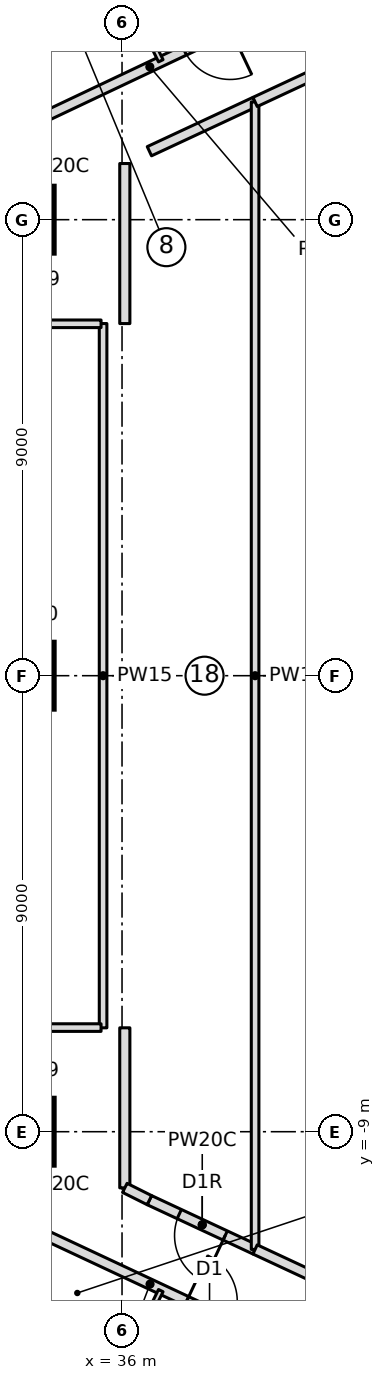
"""IFC4 building model, lengths in metres.
Left out: names, types, materials, properties, quantities, classifications, styles, units other than length and angle.
Written with IfcOpenShell. Run it as: python <this file> out.ifc"""

import sys

from ifc_helpers import new_model, si_unit, direction, frame, frame_2d, origin, origin_2d, place, context, subcontext, project, spatial, rectangle, extrude, element, fill, save


model = new_model("IFC4")
c1 = context("Model", 3, precision=1e-05, world=origin(), true_north=direction((0.0, 1.0)))
c2 = subcontext(c1, "Body", "Model", "MODEL_VIEW")
j1 = project(units=[si_unit("LENGTHUNIT", "METRE"), si_unit("PLANEANGLEUNIT", "RADIAN")], contexts=[c1])
p1 = place(None, origin())
s1 = spatial("IfcSite", under=j1, at=p1, CompositionType="ELEMENT")
p2 = place(p1, origin())
s2 = spatial("IfcBuilding", under=s1, at=p2, CompositionType="ELEMENT")
p3 = place(p2, frame((0.0, 0.0, 43.15)))
s3 = spatial("IfcBuildingStorey", under=s2, at=p3, CompositionType="ELEMENT", Elevation=43.15)
for number, where, z_axis, x_axis in (
    (1, (34.0, -9.0, 0.0), (0.0, 0.0, 1.0), (1.0, 0.0, 0.0)),
    (2, (34.0, 0.0, 0.0), (0.0, 0.0, 1.0), (1.0, 0.0, 0.0)),
    (3, (34.0, 9.0, 0.0), (0.0, 0.0, 1.0), (1.0, 0.0, 0.0)),
):
    element("IfcColumn", number, at=place(p3, frame(where, z_axis=z_axis, x_axis=x_axis)), inside=s3, PredefinedType="COLUMN", context=c2, shape_type="SweptSolid", body=[
        extrude(rectangle(XDim=1.3, YDim=1.3, at=origin_2d()), origin(), (0.0, 0.0, 1.0), 3.55),
    ])
p4 = place(p3, frame((38.585, 12.981, 0.0), z_axis=(0.0, 0.0, 1.0), x_axis=(-0.903706948966, -0.428151550727, 0.0)))
e4 = element("IfcWall", 4, at=p4, inside=s3, PredefinedType="PARTITIONING", context=c2, shape_type="SweptSolid", body=[
    extrude(rectangle(XDim=4.506, YDim=0.2, at=frame_2d((2.253, 0.0))), origin(), (0.0, 0.0, 1.0), 3.25),
])
p5 = place(p4, frame((0.5, 0.0, 0.0)))
e5 = element("IfcOpeningElement", 5, at=p5, cuts=e4, PredefinedType="OPENING", context=c2, shape_type="SweptSolid", body=[
    extrude(rectangle(XDim=1.0, YDim=2.1, at=frame_2d((0.5, 1.05))), frame((0.0, 0.11, 0.0), z_axis=(0.0, -1.0, 0.0), x_axis=(1.0, 0.0, 0.0)), (0.0, 0.0, 1.0), 0.22),
])
p6 = place(p3, frame((35.767, 14.183, 0.0), z_axis=(0.0, 0.0, 1.0), x_axis=(0.438229314017, -0.898863208912, 0.0)))
e6 = element("IfcWall", 6, at=p6, inside=s3, PredefinedType="PARTITIONING", context=c2, shape_type="SweptSolid", body=[
    extrude(rectangle(XDim=2.277, YDim=0.1, at=frame_2d((1.139, 0.0))), origin(), (0.0, 0.0, 1.0), 3.25),
])
p7 = place(p6, frame((0.75, 0.0, 0.0)))
e7 = element("IfcOpeningElement", 7, at=p7, cuts=e6, PredefinedType="OPENING", context=c2, shape_type="SweptSolid", body=[
    extrude(rectangle(XDim=0.8, YDim=2.1, at=frame_2d((0.4, 1.05))), frame((0.0, 0.06, 0.0), z_axis=(0.0, -1.0, 0.0), x_axis=(1.0, 0.0, 0.0)), (0.0, 0.0, 1.0), 0.12),
])
p8 = place(p3, frame((34.512, -11.052, 0.0), z_axis=(0.0, 0.0, 1.0), x_axis=(0.905585758423, -0.424163216394, 0.0)))
e8 = element("IfcWall", 8, at=p8, inside=s3, PredefinedType="PARTITIONING", context=c2, shape_type="SweptSolid", body=[
    extrude(rectangle(XDim=4.507, YDim=0.2, at=frame_2d((2.253, 0.0))), origin(), (0.0, 0.0, 1.0), 3.25),
])
p9 = place(p8, frame((3.05, 0.0, 0.0)))
e9 = element("IfcOpeningElement", 9, at=p9, cuts=e8, PredefinedType="OPENING", context=c2, shape_type="SweptSolid", body=[
    extrude(rectangle(XDim=1.0, YDim=2.1, at=frame_2d((0.5, 1.05))), frame((0.0, 0.11, 0.0), z_axis=(0.0, -1.0, 0.0), x_axis=(1.0, 0.0, 0.0)), (0.0, 0.0, 1.0), 0.22),
])
p10 = place(p3, frame((36.765, -12.136, 0.0), z_axis=(0.0, 0.0, 1.0), x_axis=(-0.438229314017, -0.898863208912, 0.0)))
e10 = element("IfcWall", 10, at=p10, inside=s3, PredefinedType="PARTITIONING", context=c2, shape_type="SweptSolid", body=[
    extrude(rectangle(XDim=2.277, YDim=0.1, at=frame_2d((1.139, 0.0))), origin(), (0.0, 0.0, 1.0), 3.25),
])
p11 = place(p10, frame((0.75, 0.0, 0.0)))
e11 = element("IfcOpeningElement", 11, at=p11, cuts=e10, PredefinedType="OPENING", context=c2, shape_type="SweptSolid", body=[
    extrude(rectangle(XDim=0.8, YDim=2.1, at=frame_2d((0.4, 1.05))), frame((0.0, 0.06, 0.0), z_axis=(0.0, -1.0, 0.0), x_axis=(1.0, 0.0, 0.0)), (0.0, 0.0, 1.0), 0.12),
])
p12 = place(p3, frame((35.626, -6.95, 0.0), z_axis=(0.0, 0.0, 1.0), x_axis=(0.0, 1.0, 0.0)))
e12 = element("IfcWall", 12, at=p12, inside=s3, PredefinedType="PARTITIONING", context=c2, shape_type="SweptSolid", body=[
    extrude(rectangle(XDim=13.9, YDim=0.15, at=frame_2d((6.95, 0.0))), origin(), (0.0, 0.0, 1.0), 3.25),
])
p13 = place(p3, frame((38.626, -11.323, 0.0), z_axis=(0.0, 0.0, 1.0), x_axis=(-0.906372737018, 0.422478948103, 0.0)))
e13 = element("IfcWall", 13, at=p13, inside=s3, PredefinedType="PARTITIONING", context=c2, shape_type="SweptSolid", body=[
    extrude(rectangle(XDim=2.302, YDim=0.2, at=frame_2d((1.151, 0.0))), origin(), (0.0, 0.0, 1.0), 3.25),
])
p14 = place(p13, frame((0.651, 0.0, 0.0)))
e14 = element("IfcOpeningElement", 14, at=p14, cuts=e13, PredefinedType="OPENING", context=c2, shape_type="SweptSolid", body=[
    extrude(rectangle(XDim=1.0, YDim=2.1, at=frame_2d((0.5, 1.05))), frame((0.0, 0.11, 0.0), z_axis=(0.0, -1.0, 0.0), x_axis=(1.0, 0.0, 0.0)), (0.0, 0.0, 1.0), 0.22),
])
p15 = place(p3, frame((36.54, 10.351, 0.0), z_axis=(0.0, 0.0, 1.0), x_axis=(0.906372737018, 0.422478948103, 0.0)))
e15 = element("IfcWall", 15, at=p15, inside=s3, PredefinedType="PARTITIONING", context=c2, shape_type="SweptSolid", body=[
    extrude(rectangle(XDim=2.302, YDim=0.2, at=frame_2d((1.151, 0.0))), origin(), (0.0, 0.0, 1.0), 3.25),
])
p16 = place(p3, frame((38.626, -11.323, 0.0), z_axis=(0.0, 0.0, 1.0), x_axis=(0.0, 1.0, 0.0)))
e16 = element("IfcWall", 16, at=p16, inside=s3, PredefinedType="PARTITIONING", context=c2, shape_type="SweptSolid", body=[
    extrude(rectangle(XDim=22.647, YDim=0.15, at=frame_2d((11.323, 0.0))), origin(), (0.0, 0.0, 1.0), 3.25),
])
for number, where, z_axis, x_axis in (
    (17, (40.18, -12.048, 0.0), (0.0, 0.0, 1.0), (-0.906, 0.423, 0.0)),
    (18, (38.626, 11.323, 0.0), (0.0, 0.0, 1.0), (0.906, 0.423, 0.0)),
):
    element("IfcWall", number, at=place(p3, frame(where, z_axis=z_axis, x_axis=x_axis)), inside=s3, PredefinedType="PARTITIONING", context=c2, shape_type="SweptSolid", body=[
        extrude(rectangle(XDim=1.714, YDim=0.2, at=frame_2d((0.857, 0.0))), origin(), (0.0, 0.0, 1.0), 3.25),
    ])
p17 = place(p3, frame((35.586, -6.945, 0.0), z_axis=(0.0, 0.0, 1.0), x_axis=(-0.999999997748, -6.7114094e-05, 0.0)))
e19 = element("IfcWall", 19, at=p17, inside=s3, PredefinedType="PARTITIONING", context=c2, shape_type="SweptSolid", body=[
    extrude(rectangle(XDim=3.638, YDim=0.15, at=frame_2d((1.819, 0.0))), origin(), (0.0, 0.0, 1.0), 3.25),
])
p18 = place(p3, frame((31.989, 6.945, 0.0), z_axis=(0.0, 0.0, 1.0), x_axis=(0.999999997697, -6.786102e-05, 0.0)))
e20 = element("IfcWall", 20, at=p18, inside=s3, PredefinedType="PARTITIONING", context=c2, shape_type="SweptSolid", body=[
    extrude(rectangle(XDim=3.598, YDim=0.15, at=frame_2d((1.799, 0.0))), origin(), (0.0, 0.0, 1.0), 3.25),
])
for number, where, z_axis, x_axis in (
    (21, (36.055, -10.108, 0.0), (0.0, 0.0, 1.0), (0.0, 1.0, 0.0)),
    (22, (36.055, 6.949, 0.0), (0.0, 0.0, 1.0), (0.0, 1.0, 0.0)),
):
    element("IfcWall", number, at=place(p3, frame(where, z_axis=z_axis, x_axis=x_axis)), inside=s3, PredefinedType="PARTITIONING", context=c2, shape_type="SweptSolid", body=[
        extrude(rectangle(XDim=3.159, YDim=0.2, at=frame_2d((1.58, 0.0))), origin(), (0.0, 0.0, 1.0), 3.25),
    ])
p19 = place(p3, frame((36.54, -10.351, 0.0), z_axis=(0.0, 0.0, 1.0), x_axis=(-0.894337154042, 0.447393624116, 0.0)))
e23 = element("IfcWall", 23, at=p19, inside=s3, PredefinedType="PARTITIONING", context=c2, shape_type="SweptSolid", body=[
    extrude(rectangle(XDim=0.542, YDim=0.2, at=frame_2d((0.271, 0.0))), origin(), (0.0, 0.0, 1.0), 3.25),
])
p20 = place(p14, origin())
e24 = element("IfcDoor", 24, at=p20, inside=s3, OperationType="SINGLE_SWING_RIGHT", PredefinedType="DOOR", context=c2, shape_type="SweptSolid", body=[
    extrude(rectangle(XDim=1.0, YDim=2.1, at=frame_2d((0.5, 1.05))), frame((0.0, 0.025, 0.0), z_axis=(0.0, -1.0, 0.0), x_axis=(1.0, 0.0, 0.0)), (0.0, 0.0, 1.0), 0.05),
])
fill(e14, e24)
save(model, sys.argv[1])
